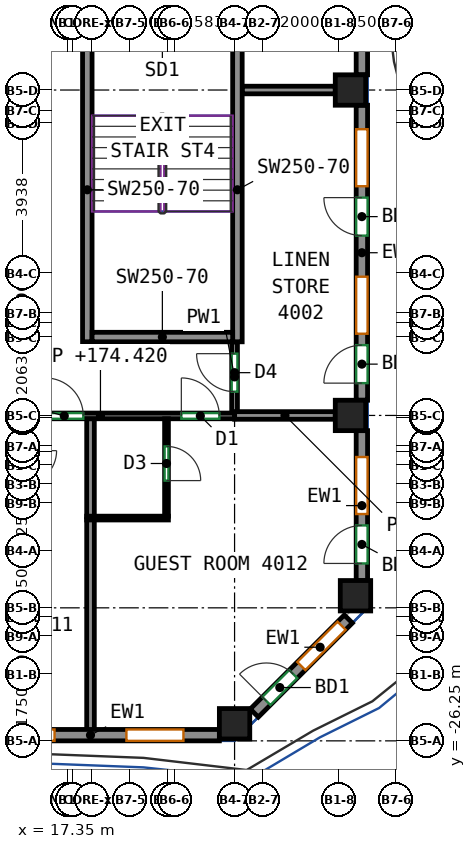
"""IFC4 building model, lengths in metres.
Left out: names, types, materials, properties, quantities, classifications, styles, units other than length and angle.
Written with IfcOpenShell. Run it as: python <this file> out.ifc"""

import sys

from ifc_helpers import new_model, si_unit, direction, frame, frame_2d, origin, origin_2d, place, context, subcontext, project, spatial, rectangle, extrude, source, transform, mapped, element, fill, save


model = new_model("IFC4")
c1 = context("Model", 3, precision=1e-05, world=origin(), true_north=direction((0.0, 1.0)))
c2 = subcontext(c1, "Body", "Model", "MODEL_VIEW")
j1 = project(units=[si_unit("LENGTHUNIT", "METRE"), si_unit("PLANEANGLEUNIT", "RADIAN")], contexts=[c1])
p1 = place(None, origin())
s1 = spatial("IfcSite", under=j1, at=p1, CompositionType="ELEMENT")
p2 = place(p1, origin())
s2 = spatial("IfcBuilding", under=s1, at=p2, CompositionType="ELEMENT")
p3 = place(p2, frame((0.0, 0.0, 171.9)))
s3 = spatial("IfcBuildingStorey", under=s2, at=p3, CompositionType="ELEMENT", Elevation=171.9)
m1 = source(origin(), c2, "Body", "SweptSolid", [
    extrude(rectangle(XDim=0.8, YDim=0.8, at=origin_2d()), origin(), (0.0, 0.0, 1.0), 3.12),
])
for number, where, z_axis, x_axis in (
    (1, (21.75, -25.8, 0.0), (0.0, 0.0, 1.0), (1.0, 0.0, 0.0)),
    (2, (24.8, -17.688, 0.0), (0.0, 0.0, 1.0), (1.0, 0.0, 0.0)),
    (3, (24.8, -9.125, 0.0), (0.0, 0.0, 1.0), (1.0, 0.0, 0.0)),
    (4, (24.932, -22.432, 0.0), (0.0, 0.0, 1.0), (1.0, 0.0, 0.0)),
):
    element("IfcColumn", number, at=place(p3, frame(where, z_axis=z_axis, x_axis=x_axis)), inside=s3, PredefinedType="COLUMN", context=c2, shape_type="MappedRepresentation", body=[
        mapped(m1, transform((0.0, 0.0, 0.0))),
    ])
m2 = source(origin(), c2, "Body", "SweptSolid", [
    extrude(rectangle(XDim=8.0, YDim=0.25, at=frame_2d((4.0, 0.0))), origin(), (0.0, 0.0, 1.0), 3.12),
])
for number, where, z_axis, x_axis in (
    (5, (17.875, -15.75, 0.0), (0.0, 0.0, 1.0), (0.0, 1.0, 0.0)),
    (6, (21.825, -15.75, 0.0), (0.0, 0.0, 1.0), (0.0, 1.0, 0.0)),
):
    element("IfcWall", number, at=place(p3, frame(where, z_axis=z_axis, x_axis=x_axis)), inside=s3, PredefinedType="SHEAR", context=c2, shape_type="MappedRepresentation", body=[
        mapped(m2, transform((0.0, 0.0, 0.0))),
    ])
m3 = source(origin(), c2, "Body", "SweptSolid", [
    extrude(rectangle(XDim=3.7, YDim=0.25, at=frame_2d((1.85, 0.0))), origin(), (0.0, 0.0, 1.0), 3.12),
])
p4 = place(p3, frame((18.0, -15.625, 0.0), z_axis=(0.0, 0.0, 1.0), x_axis=(1.0, 0.0, 0.0)))
e7 = element("IfcWall", 7, at=p4, inside=s3, PredefinedType="SHEAR", context=c2, shape_type="MappedRepresentation", body=[
    mapped(m3, transform((0.0, 0.0, 0.0))),
])
m4 = source(origin(), c2, "Body", "SweptSolid", [
    extrude(rectangle(XDim=6.783, YDim=0.3, at=frame_2d((3.392, 0.0))), origin(), (0.0, 0.0, 1.0), 3.12),
])
p5 = place(p3, frame((14.567, -26.1, 0.0), z_axis=(0.0, 0.0, 1.0), x_axis=(1.0, 0.0, 0.0)))
e8 = element("IfcWall", 8, at=p5, inside=s3, PredefinedType="SOLIDWALL", context=c2, shape_type="MappedRepresentation", body=[
    mapped(m4, transform((0.0, 0.0, 0.0))),
])
p6 = place(p5, frame((0.946, 0.0, 0.85)))
e9 = element("IfcOpeningElement", 9, at=p6, cuts=e8, PredefinedType="OPENING", context=c2, shape_type="SweptSolid", body=[
    extrude(rectangle(XDim=1.5, YDim=1.95, at=frame_2d((0.75, 0.975))), frame((0.0, 0.16, 0.0), z_axis=(0.0, -1.0, 0.0), x_axis=(1.0, 0.0, 0.0)), (0.0, 0.0, 1.0), 0.32),
])
p7 = place(p5, frame((4.337, 0.0, 0.85)))
e10 = element("IfcOpeningElement", 10, at=p7, cuts=e8, PredefinedType="OPENING", context=c2, shape_type="SweptSolid", body=[
    extrude(rectangle(XDim=1.5, YDim=1.95, at=frame_2d((0.75, 0.975))), frame((0.0, 0.16, 0.0), z_axis=(0.0, -1.0, 0.0), x_axis=(1.0, 0.0, 0.0)), (0.0, 0.0, 1.0), 0.32),
])
m5 = source(origin(), c2, "Body", "SweptSolid", [
    extrude(rectangle(XDim=3.5, YDim=0.3, at=frame_2d((1.75, 0.0))), origin(), (0.0, 0.0, 1.0), 3.12),
])
p8 = place(p3, frame((22.269, -25.519, 0.0), z_axis=(0.0, 0.0, 1.0), x_axis=(0.707141656123, 0.70707190453, 0.0)))
e11 = element("IfcWall", 11, at=p8, inside=s3, PredefinedType="SOLIDWALL", context=c2, shape_type="MappedRepresentation", body=[
    mapped(m5, transform((0.0, 0.0, 0.0))),
])
p9 = place(p8, frame((1.75, 0.0, 0.85)))
e12 = element("IfcOpeningElement", 12, at=p9, cuts=e11, PredefinedType="OPENING", context=c2, shape_type="SweptSolid", body=[
    extrude(rectangle(XDim=1.5, YDim=1.95, at=frame_2d((0.75, 0.975))), frame((0.0, 0.16, 0.0), z_axis=(0.0, -1.0, 0.0), x_axis=(1.0, 0.0, 0.0)), (0.0, 0.0, 1.0), 0.32),
])
p10 = place(p8, frame((0.45, 0.0, 0.0)))
e13 = element("IfcOpeningElement", 13, at=p10, cuts=e11, PredefinedType="OPENING", context=c2, shape_type="SweptSolid", body=[
    extrude(rectangle(XDim=1.0, YDim=2.1, at=frame_2d((0.5, 1.05))), frame((0.0, 0.16, 0.0), z_axis=(0.0, -1.0, 0.0), x_axis=(1.0, 0.0, 0.0)), (0.0, 0.0, 1.0), 0.32),
])
m6 = source(origin(), c2, "Body", "SweptSolid", [
    extrude(rectangle(XDim=3.944, YDim=0.3, at=frame_2d((1.972, 0.0))), origin(), (0.0, 0.0, 1.0), 3.12),
])
p11 = place(p3, frame((25.1, -22.032, 0.0), z_axis=(0.0, 0.0, 1.0), x_axis=(0.0, 1.0, 0.0)))
e14 = element("IfcWall", 14, at=p11, inside=s3, PredefinedType="SOLIDWALL", context=c2, shape_type="MappedRepresentation", body=[
    mapped(m6, transform((0.0, 0.0, 0.0))),
])
p12 = place(p11, frame((1.75, 0.0, 0.85)))
e15 = element("IfcOpeningElement", 15, at=p12, cuts=e14, PredefinedType="OPENING", context=c2, shape_type="SweptSolid", body=[
    extrude(rectangle(XDim=1.5, YDim=1.95, at=frame_2d((0.75, 0.975))), frame((0.0, 0.16, 0.0), z_axis=(0.0, -1.0, 0.0), x_axis=(1.0, 0.0, 0.0)), (0.0, 0.0, 1.0), 0.32),
])
p13 = place(p11, frame((0.45, 0.0, 0.0)))
e16 = element("IfcOpeningElement", 16, at=p13, cuts=e14, PredefinedType="OPENING", context=c2, shape_type="SweptSolid", body=[
    extrude(rectangle(XDim=1.0, YDim=2.1, at=frame_2d((0.5, 1.05))), frame((0.0, 0.16, 0.0), z_axis=(0.0, -1.0, 0.0), x_axis=(1.0, 0.0, 0.0)), (0.0, 0.0, 1.0), 0.32),
])
m7 = source(origin(), c2, "Body", "SweptSolid", [
    extrude(rectangle(XDim=7.763, YDim=0.3, at=frame_2d((3.881, 0.0))), origin(), (0.0, 0.0, 1.0), 3.12),
])
p14 = place(p3, frame((25.1, -17.288, 0.0), z_axis=(0.0, 0.0, 1.0), x_axis=(0.0, 1.0, 0.0)))
e17 = element("IfcWall", 17, at=p14, inside=s3, PredefinedType="SOLIDWALL", context=c2, shape_type="MappedRepresentation", body=[
    mapped(m7, transform((0.0, 0.0, 0.0))),
])
p15 = place(p14, frame((1.75, 0.0, 0.85)))
e18 = element("IfcOpeningElement", 18, at=p15, cuts=e17, PredefinedType="OPENING", context=c2, shape_type="SweptSolid", body=[
    extrude(rectangle(XDim=1.5, YDim=1.95, at=frame_2d((0.75, 0.975))), frame((0.0, 0.16, 0.0), z_axis=(0.0, -1.0, 0.0), x_axis=(1.0, 0.0, 0.0)), (0.0, 0.0, 1.0), 0.32),
])
p16 = place(p14, frame((0.45, 0.0, 0.0)))
e19 = element("IfcOpeningElement", 19, at=p16, cuts=e17, PredefinedType="OPENING", context=c2, shape_type="SweptSolid", body=[
    extrude(rectangle(XDim=1.0, YDim=2.1, at=frame_2d((0.5, 1.05))), frame((0.0, 0.16, 0.0), z_axis=(0.0, -1.0, 0.0), x_axis=(1.0, 0.0, 0.0)), (0.0, 0.0, 1.0), 0.32),
])
p17 = place(p14, frame((5.631, 0.0, 0.85)))
e20 = element("IfcOpeningElement", 20, at=p17, cuts=e17, PredefinedType="OPENING", context=c2, shape_type="SweptSolid", body=[
    extrude(rectangle(XDim=1.5, YDim=1.95, at=frame_2d((0.75, 0.975))), frame((0.0, 0.16, 0.0), z_axis=(0.0, -1.0, 0.0), x_axis=(1.0, 0.0, 0.0)), (0.0, 0.0, 1.0), 0.32),
])
p18 = place(p14, frame((4.331, 0.0, 0.0)))
e21 = element("IfcOpeningElement", 21, at=p18, cuts=e17, PredefinedType="OPENING", context=c2, shape_type="SweptSolid", body=[
    extrude(rectangle(XDim=1.0, YDim=2.1, at=frame_2d((0.5, 1.05))), frame((0.0, 0.16, 0.0), z_axis=(0.0, -1.0, 0.0), x_axis=(1.0, 0.0, 0.0)), (0.0, 0.0, 1.0), 0.32),
])
p19 = place(p3, frame((25.1, -8.725, 0.0), z_axis=(0.0, 0.0, 1.0), x_axis=(0.0, 1.0, 0.0)))
e22 = element("IfcWall", 22, at=p19, inside=s3, PredefinedType="SOLIDWALL", context=c2, shape_type="MappedRepresentation", body=[
    mapped(m7, transform((0.0, 0.0, 0.0))),
])
p20 = place(p19, frame((1.75, 0.0, 0.85)))
e23 = element("IfcOpeningElement", 23, at=p20, cuts=e22, PredefinedType="OPENING", context=c2, shape_type="SweptSolid", body=[
    extrude(rectangle(XDim=1.5, YDim=1.95, at=frame_2d((0.75, 0.975))), frame((0.0, 0.16, 0.0), z_axis=(0.0, -1.0, 0.0), x_axis=(1.0, 0.0, 0.0)), (0.0, 0.0, 1.0), 0.32),
])
p21 = place(p19, frame((5.631, 0.0, 0.85)))
e24 = element("IfcOpeningElement", 24, at=p21, cuts=e22, PredefinedType="OPENING", context=c2, shape_type="SweptSolid", body=[
    extrude(rectangle(XDim=1.5, YDim=1.95, at=frame_2d((0.75, 0.975))), frame((0.0, 0.16, 0.0), z_axis=(0.0, -1.0, 0.0), x_axis=(1.0, 0.0, 0.0)), (0.0, 0.0, 1.0), 0.32),
])
p22 = place(p3, frame((14.692, -17.7, 0.0), z_axis=(0.0, 0.0, 1.0), x_axis=(1.0, 0.0, 0.0)))
e25 = element("IfcWall", 25, at=p22, inside=s3, PredefinedType="PARTITIONING", context=c2, shape_type="SweptSolid", body=[
    extrude(rectangle(XDim=7.058, YDim=0.15, at=frame_2d((3.529, 0.0))), origin(), (0.0, 0.0, 1.0), 2.52),
])
p23 = place(p22, frame((2.077, 0.0, 0.0)))
e26 = element("IfcOpeningElement", 26, at=p23, cuts=e25, PredefinedType="OPENING", context=c2, shape_type="SweptSolid", body=[
    extrude(rectangle(XDim=1.0, YDim=2.1, at=frame_2d((0.5, 1.05))), frame((0.0, 0.085, 0.0), z_axis=(0.0, -1.0, 0.0), x_axis=(1.0, 0.0, 0.0)), (0.0, 0.0, 1.0), 0.17),
])
p24 = place(p22, frame((5.657, 0.0, 0.0)))
e27 = element("IfcOpeningElement", 27, at=p24, cuts=e25, PredefinedType="OPENING", context=c2, shape_type="SweptSolid", body=[
    extrude(rectangle(XDim=1.0, YDim=2.1, at=frame_2d((0.5, 1.05))), frame((0.0, 0.085, 0.0), z_axis=(0.0, -1.0, 0.0), x_axis=(1.0, 0.0, 0.0)), (0.0, 0.0, 1.0), 0.17),
])
p25 = place(p3, frame((21.75, -17.598, 0.0), z_axis=(0.0, 0.0, 1.0), x_axis=(0.0, 1.0, 0.0)))
e28 = element("IfcWall", 28, at=p25, inside=s3, PredefinedType="PARTITIONING", context=c2, shape_type="SweptSolid", body=[
    extrude(rectangle(XDim=1.848, YDim=0.15, at=frame_2d((0.924, 0.0))), origin(), (0.0, 0.0, 1.0), 3.12),
])
p26 = place(p25, frame((0.536, 0.0, 0.0)))
e29 = element("IfcOpeningElement", 29, at=p26, cuts=e28, PredefinedType="OPENING", context=c2, shape_type="SweptSolid", body=[
    extrude(rectangle(XDim=1.0, YDim=2.1, at=frame_2d((0.5, 1.05))), frame((0.0, 0.085, 0.0), z_axis=(0.0, -1.0, 0.0), x_axis=(1.0, 0.0, 0.0)), (0.0, 0.0, 1.0), 0.17),
])
p27 = place(p3, frame((17.959, -26.0, 0.0), z_axis=(0.0, 0.0, 1.0), x_axis=(0.0, 1.0, 0.0)))
e30 = element("IfcWall", 30, at=p27, inside=s3, PredefinedType="PARTITIONING", context=c2, shape_type="SweptSolid", body=[
    extrude(rectangle(XDim=5.572, YDim=0.2, at=frame_2d((2.786, 0.0))), origin(), (0.0, 0.0, 1.0), 3.12),
])
p28 = place(p3, frame((17.959, -20.348, 0.0), z_axis=(0.0, 0.0, 1.0), x_axis=(0.0, 1.0, 0.0)))
e31 = element("IfcWall", 31, at=p28, inside=s3, PredefinedType="PARTITIONING", context=c2, shape_type="SweptSolid", body=[
    extrude(rectangle(XDim=2.571, YDim=0.2, at=frame_2d((1.285, 0.0))), origin(), (0.0, 0.0, 1.0), 3.12),
])
p29 = place(p3, frame((17.859, -20.388, 0.0), z_axis=(0.0, 0.0, 1.0), x_axis=(1.0, 0.0, 0.0)))
e32 = element("IfcWall", 32, at=p29, inside=s3, PredefinedType="PARTITIONING", context=c2, shape_type="SweptSolid", body=[
    extrude(rectangle(XDim=2.15, YDim=0.1, at=frame_2d((1.075, 0.0))), origin(), (0.0, 0.0, 1.0), 3.12),
])
p30 = place(p3, frame((19.959, -17.777, 0.0), z_axis=(0.0, 0.0, 1.0), x_axis=(0.0, -1.0, 0.0)))
e33 = element("IfcWall", 33, at=p30, inside=s3, PredefinedType="PARTITIONING", context=c2, shape_type="SweptSolid", body=[
    extrude(rectangle(XDim=2.561, YDim=0.1, at=frame_2d((1.28, 0.0))), origin(), (0.0, 0.0, 1.0), 3.12),
])
p31 = place(p30, frame((0.725, 0.0, 0.0)))
e34 = element("IfcOpeningElement", 34, at=p31, cuts=e33, PredefinedType="OPENING", context=c2, shape_type="SweptSolid", body=[
    extrude(rectangle(XDim=0.9, YDim=2.1, at=frame_2d((0.45, 1.05))), frame((0.0, 0.06, 0.0), z_axis=(0.0, -1.0, 0.0), x_axis=(1.0, 0.0, 0.0)), (0.0, 0.0, 1.0), 0.12),
])
p32 = place(p3, frame((21.752, -17.688, 0.0), z_axis=(0.0, 0.0, 1.0), x_axis=(1.0, 0.0, 0.0)))
e35 = element("IfcWall", 35, at=p32, inside=s3, PredefinedType="PARTITIONING", context=c2, shape_type="SweptSolid", body=[
    extrude(rectangle(XDim=2.648, YDim=0.2, at=frame_2d((1.324, 0.0))), origin(), (0.0, 0.0, 1.0), 2.52),
])
p33 = place(p3, frame((21.95, -9.125, 0.0), z_axis=(0.0, 0.0, 1.0), x_axis=(1.0, 0.0, 0.0)))
e36 = element("IfcWall", 36, at=p33, inside=s3, PredefinedType="PARTITIONING", context=c2, shape_type="SweptSolid", body=[
    extrude(rectangle(XDim=2.45, YDim=0.2, at=frame_2d((1.225, 0.0))), origin(), (0.0, 0.0, 1.0), 3.12),
])
p34 = place(p6, origin())
e37 = element("IfcWindow", 37, at=p34, inside=s3, PartitioningType="SINGLE_PANEL", PredefinedType="WINDOW", context=c2, shape_type="SweptSolid", body=[
    extrude(rectangle(XDim=1.5, YDim=1.95, at=frame_2d((0.75, 0.975))), frame((0.0, 0.03, 0.0), z_axis=(0.0, -1.0, 0.0), x_axis=(1.0, 0.0, 0.0)), (0.0, 0.0, 1.0), 0.06),
])
fill(e9, e37)
p35 = place(p7, origin())
e38 = element("IfcWindow", 38, at=p35, inside=s3, PartitioningType="SINGLE_PANEL", PredefinedType="WINDOW", context=c2, shape_type="SweptSolid", body=[
    extrude(rectangle(XDim=1.5, YDim=1.95, at=frame_2d((0.75, 0.975))), frame((0.0, 0.03, 0.0), z_axis=(0.0, -1.0, 0.0), x_axis=(1.0, 0.0, 0.0)), (0.0, 0.0, 1.0), 0.06),
])
fill(e10, e38)
p36 = place(p9, origin())
e39 = element("IfcWindow", 39, at=p36, inside=s3, PartitioningType="SINGLE_PANEL", PredefinedType="WINDOW", context=c2, shape_type="SweptSolid", body=[
    extrude(rectangle(XDim=1.5, YDim=1.95, at=frame_2d((0.75, 0.975))), frame((0.0, 0.03, 0.0), z_axis=(0.0, -1.0, 0.0), x_axis=(1.0, 0.0, 0.0)), (0.0, 0.0, 1.0), 0.06),
])
fill(e12, e39)
p37 = place(p10, origin())
e40 = element("IfcDoor", 40, at=p37, inside=s3, OperationType="SINGLE_SWING_LEFT", PredefinedType="DOOR", context=c2, shape_type="SweptSolid", body=[
    extrude(rectangle(XDim=1.0, YDim=2.1, at=frame_2d((0.5, 1.05))), frame((0.0, 0.025, 0.0), z_axis=(0.0, -1.0, 0.0), x_axis=(1.0, 0.0, 0.0)), (0.0, 0.0, 1.0), 0.05),
])
fill(e13, e40)
p38 = place(p12, origin())
e41 = element("IfcWindow", 41, at=p38, inside=s3, PartitioningType="SINGLE_PANEL", PredefinedType="WINDOW", context=c2, shape_type="SweptSolid", body=[
    extrude(rectangle(XDim=1.5, YDim=1.95, at=frame_2d((0.75, 0.975))), frame((0.0, 0.03, 0.0), z_axis=(0.0, -1.0, 0.0), x_axis=(1.0, 0.0, 0.0)), (0.0, 0.0, 1.0), 0.06),
])
fill(e15, e41)
p39 = place(p13, origin())
e42 = element("IfcDoor", 42, at=p39, inside=s3, OperationType="SINGLE_SWING_LEFT", PredefinedType="DOOR", context=c2, shape_type="SweptSolid", body=[
    extrude(rectangle(XDim=1.0, YDim=2.1, at=frame_2d((0.5, 1.05))), frame((0.0, 0.025, 0.0), z_axis=(0.0, -1.0, 0.0), x_axis=(1.0, 0.0, 0.0)), (0.0, 0.0, 1.0), 0.05),
])
fill(e16, e42)
p40 = place(p15, origin())
e43 = element("IfcWindow", 43, at=p40, inside=s3, PartitioningType="SINGLE_PANEL", PredefinedType="WINDOW", context=c2, shape_type="SweptSolid", body=[
    extrude(rectangle(XDim=1.5, YDim=1.95, at=frame_2d((0.75, 0.975))), frame((0.0, 0.03, 0.0), z_axis=(0.0, -1.0, 0.0), x_axis=(1.0, 0.0, 0.0)), (0.0, 0.0, 1.0), 0.06),
])
fill(e18, e43)
p41 = place(p16, origin())
e44 = element("IfcDoor", 44, at=p41, inside=s3, OperationType="SINGLE_SWING_LEFT", PredefinedType="DOOR", context=c2, shape_type="SweptSolid", body=[
    extrude(rectangle(XDim=1.0, YDim=2.1, at=frame_2d((0.5, 1.05))), frame((0.0, 0.025, 0.0), z_axis=(0.0, -1.0, 0.0), x_axis=(1.0, 0.0, 0.0)), (0.0, 0.0, 1.0), 0.05),
])
fill(e19, e44)
p42 = place(p17, origin())
e45 = element("IfcWindow", 45, at=p42, inside=s3, PartitioningType="SINGLE_PANEL", PredefinedType="WINDOW", context=c2, shape_type="SweptSolid", body=[
    extrude(rectangle(XDim=1.5, YDim=1.95, at=frame_2d((0.75, 0.975))), frame((0.0, 0.03, 0.0), z_axis=(0.0, -1.0, 0.0), x_axis=(1.0, 0.0, 0.0)), (0.0, 0.0, 1.0), 0.06),
])
fill(e20, e45)
p43 = place(p18, origin())
e46 = element("IfcDoor", 46, at=p43, inside=s3, OperationType="SINGLE_SWING_RIGHT", PredefinedType="DOOR", context=c2, shape_type="SweptSolid", body=[
    extrude(rectangle(XDim=1.0, YDim=2.1, at=frame_2d((0.5, 1.05))), frame((0.0, 0.025, 0.0), z_axis=(0.0, -1.0, 0.0), x_axis=(1.0, 0.0, 0.0)), (0.0, 0.0, 1.0), 0.05),
])
fill(e21, e46)
p44 = place(p31, origin())
e47 = element("IfcDoor", 47, at=p44, inside=s3, OperationType="SINGLE_SWING_RIGHT", PredefinedType="DOOR", context=c2, shape_type="SweptSolid", body=[
    extrude(rectangle(XDim=0.9, YDim=2.1, at=frame_2d((0.45, 1.05))), frame((0.0, 0.025, 0.0), z_axis=(0.0, -1.0, 0.0), x_axis=(1.0, 0.0, 0.0)), (0.0, 0.0, 1.0), 0.05),
])
fill(e34, e47)
p45 = place(p23, origin())
e48 = element("IfcDoor", 48, at=p45, inside=s3, OperationType="SINGLE_SWING_LEFT", PredefinedType="DOOR", context=c2, shape_type="SweptSolid", body=[
    extrude(rectangle(XDim=1.0, YDim=2.1, at=frame_2d((0.5, 1.05))), frame((0.0, 0.025, 0.0), z_axis=(0.0, -1.0, 0.0), x_axis=(1.0, 0.0, 0.0)), (0.0, 0.0, 1.0), 0.05),
])
fill(e26, e48)
p46 = place(p24, origin())
e49 = element("IfcDoor", 49, at=p46, inside=s3, OperationType="SINGLE_SWING_LEFT", PredefinedType="DOOR", context=c2, shape_type="SweptSolid", body=[
    extrude(rectangle(XDim=1.0, YDim=2.1, at=frame_2d((0.5, 1.05))), frame((0.0, 0.025, 0.0), z_axis=(0.0, -1.0, 0.0), x_axis=(1.0, 0.0, 0.0)), (0.0, 0.0, 1.0), 0.05),
])
fill(e27, e49)
p47 = place(p26, origin())
e50 = element("IfcDoor", 50, at=p47, inside=s3, OperationType="SINGLE_SWING_RIGHT", PredefinedType="DOOR", context=c2, shape_type="SweptSolid", body=[
    extrude(rectangle(XDim=1.0, YDim=2.1, at=frame_2d((0.5, 1.05))), frame((0.0, 0.025, 0.0), z_axis=(0.0, -1.0, 0.0), x_axis=(1.0, 0.0, 0.0)), (0.0, 0.0, 1.0), 0.05),
])
fill(e29, e50)
save(model, sys.argv[1])
